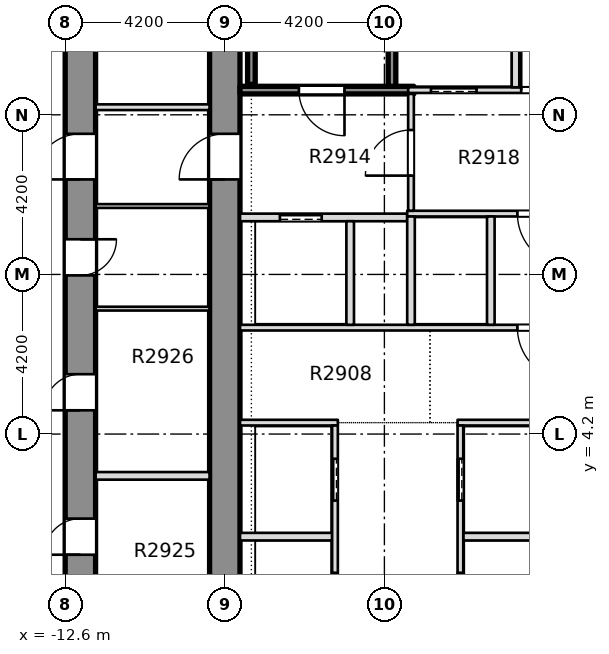
"""IFC4 building model, lengths in metres.
Left out: names, types, materials, properties, quantities, classifications, styles, units other than length and angle.
Written with IfcOpenShell. Run it as: python <this file> out.ifc"""

import sys

from ifc_helpers import new_model, si_unit, direction, frame, frame_2d, origin, place, context, subcontext, project, spatial, rectangle, extrude, element, fill, save


model = new_model("IFC4")
c1 = context("Model", 3, precision=1e-05, world=origin(), true_north=direction((0.0, 1.0)))
c2 = subcontext(c1, "Body", "Model", "MODEL_VIEW")
j1 = project(units=[si_unit("LENGTHUNIT", "METRE"), si_unit("PLANEANGLEUNIT", "RADIAN")], contexts=[c1])
p1 = place(None, origin())
s1 = spatial("IfcSite", under=j1, at=p1, CompositionType="ELEMENT")
p2 = place(p1, origin())
s2 = spatial("IfcBuilding", under=s1, at=p2, CompositionType="ELEMENT")
p3 = place(p2, frame((0.0, 0.0, 114.9)))
s3 = spatial("IfcBuildingStorey", under=s2, at=p3, CompositionType="ELEMENT", Elevation=114.9)
p4 = place(p3, frame((-12.2, -8.4, -0.32), z_axis=(0.0, 0.0, 1.0), x_axis=(0.0, 1.0, 0.0)))
e1 = element("IfcWall", 1, at=p4, inside=s3, PredefinedType="SHEAR", context=c2, shape_type="SweptSolid", body=[
    extrude(rectangle(XDim=30.15, YDim=0.8, at=frame_2d((15.075, 0.0))), origin(), (0.0, 0.0, 1.0), 3.45),
])
p5 = place(p4, frame((2.875, 0.0, 0.32)))
e2 = element("IfcOpeningElement", 2, at=p5, cuts=e1, PredefinedType="OPENING", context=c2, shape_type="SweptSolid", body=[
    extrude(rectangle(XDim=0.95, YDim=2.1, at=frame_2d((0.475, 1.05))), frame((0.0, 0.41, 0.0), z_axis=(0.0, -1.0, 0.0), x_axis=(1.0, 0.0, 0.0)), (0.0, 0.0, 1.0), 0.82),
])
p6 = place(p4, frame((6.575, 0.0, 0.32)))
e3 = element("IfcOpeningElement", 3, at=p6, cuts=e1, PredefinedType="OPENING", context=c2, shape_type="SweptSolid", body=[
    extrude(rectangle(XDim=0.95, YDim=2.1, at=frame_2d((0.475, 1.05))), frame((0.0, 0.41, 0.0), z_axis=(0.0, -1.0, 0.0), x_axis=(1.0, 0.0, 0.0)), (0.0, 0.0, 1.0), 0.82),
])
p7 = place(p4, frame((9.425, 0.0, 0.32)))
e4 = element("IfcOpeningElement", 4, at=p7, cuts=e1, PredefinedType="OPENING", context=c2, shape_type="SweptSolid", body=[
    extrude(rectangle(XDim=0.95, YDim=2.1, at=frame_2d((0.475, 1.05))), frame((0.0, 0.41, 0.0), z_axis=(0.0, -1.0, 0.0), x_axis=(1.0, 0.0, 0.0)), (0.0, 0.0, 1.0), 0.82),
])
p8 = place(p4, frame((13.225, 0.0, 0.32)))
e5 = element("IfcOpeningElement", 5, at=p8, cuts=e1, PredefinedType="OPENING", context=c2, shape_type="SweptSolid", body=[
    extrude(rectangle(XDim=0.95, YDim=2.1, at=frame_2d((0.475, 1.05))), frame((0.0, 0.41, 0.0), z_axis=(0.0, -1.0, 0.0), x_axis=(1.0, 0.0, 0.0)), (0.0, 0.0, 1.0), 0.82),
])
p9 = place(p4, frame((16.775, 0.0, 0.32)))
e6 = element("IfcOpeningElement", 6, at=p9, cuts=e1, PredefinedType="OPENING", context=c2, shape_type="SweptSolid", body=[
    extrude(rectangle(XDim=0.95, YDim=2.1, at=frame_2d((0.475, 1.05))), frame((0.0, 0.41, 0.0), z_axis=(0.0, -1.0, 0.0), x_axis=(1.0, 0.0, 0.0)), (0.0, 0.0, 1.0), 0.82),
])
p10 = place(p4, frame((24.75, 0.0, 0.32)))
e7 = element("IfcOpeningElement", 7, at=p10, cuts=e1, PredefinedType="OPENING", context=c2, shape_type="SweptSolid", body=[
    extrude(rectangle(XDim=0.95, YDim=2.1, at=frame_2d((0.475, 1.05))), frame((0.0, 0.41, 0.0), z_axis=(0.0, -1.0, 0.0), x_axis=(1.0, 0.0, 0.0)), (0.0, 0.0, 1.0), 0.82),
])
p11 = place(p4, frame((19.3, 0.0, 0.32)))
e8 = element("IfcOpeningElement", 8, at=p11, cuts=e1, PredefinedType="OPENING", context=c2, shape_type="SweptSolid", body=[
    extrude(rectangle(XDim=1.2, YDim=2.1, at=frame_2d((0.6, 1.05))), frame((0.0, 0.41, 0.0), z_axis=(0.0, -1.0, 0.0), x_axis=(1.0, 0.0, 0.0)), (0.0, 0.0, 1.0), 0.82),
])
p12 = place(p3, frame((-8.4, -7.6, -0.32), z_axis=(0.0, 0.0, 1.0), x_axis=(0.0, 1.0, 0.0)))
e9 = element("IfcWall", 9, at=p12, inside=s3, PredefinedType="SHEAR", context=c2, shape_type="SweptSolid", body=[
    extrude(rectangle(XDim=28.55, YDim=0.8, at=frame_2d((14.275, 0.0))), origin(), (0.0, 0.0, 1.0), 3.45),
])
p13 = place(p12, frame((18.5, 0.0, 0.32)))
e10 = element("IfcOpeningElement", 10, at=p13, cuts=e9, PredefinedType="OPENING", context=c2, shape_type="SweptSolid", body=[
    extrude(rectangle(XDim=1.2, YDim=2.1, at=frame_2d((0.6, 1.05))), frame((0.0, 0.41, 0.0), z_axis=(0.0, -1.0, 0.0), x_axis=(1.0, 0.0, 0.0)), (0.0, 0.0, 1.0), 0.82),
])
p14 = place(p3, frame((-7.999, 1.5, 0.0), z_axis=(0.0, 0.0, 1.0), x_axis=(1.0, 0.0, 0.0)))
e11 = element("IfcWall", 11, at=p14, inside=s3, PredefinedType="PARTITIONING", context=c2, shape_type="SweptSolid", body=[
    extrude(rectangle(XDim=2.424, YDim=0.2, at=frame_2d((1.212, 0.0))), origin(), (0.0, 0.0, 1.0), 3.13),
])
p15 = place(p3, frame((-2.125, 1.5, 0.0), z_axis=(0.0, 0.0, 1.0), x_axis=(1.0, 0.0, 0.0)))
e12 = element("IfcWall", 12, at=p15, inside=s3, PredefinedType="PARTITIONING", context=c2, shape_type="SweptSolid", body=[
    extrude(rectangle(XDim=4.25, YDim=0.2, at=frame_2d((2.125, 0.0))), origin(), (0.0, 0.0, 1.0), 3.13),
])
p16 = place(p3, frame((-7.999, 4.5, 0.0), z_axis=(0.0, 0.0, 1.0), x_axis=(1.0, 0.0, 0.0)))
e13 = element("IfcWall", 13, at=p16, inside=s3, PredefinedType="PARTITIONING", context=c2, shape_type="SweptSolid", body=[
    extrude(rectangle(XDim=2.574, YDim=0.15, at=frame_2d((1.287, 0.0))), origin(), (0.0, 0.0, 1.0), 3.13),
])
p17 = place(p3, frame((-2.275, 4.5, 0.0), z_axis=(0.0, 0.0, 1.0), x_axis=(1.0, 0.0, 0.0)))
e14 = element("IfcWall", 14, at=p17, inside=s3, PredefinedType="PARTITIONING", context=c2, shape_type="SweptSolid", body=[
    extrude(rectangle(XDim=4.55, YDim=0.15, at=frame_2d((2.275, 0.0))), origin(), (0.0, 0.0, 1.0), 3.13),
])
p18 = place(p3, frame((-7.999, 7.0, 0.0), z_axis=(0.0, 0.0, 1.0), x_axis=(1.0, 0.0, 0.0)))
e15 = element("IfcWall", 15, at=p18, inside=s3, PredefinedType="PARTITIONING", context=c2, shape_type="SweptSolid", body=[
    extrude(rectangle(XDim=15.998, YDim=0.15, at=frame_2d((7.999, 0.0))), origin(), (0.0, 0.0, 1.0), 3.13),
])
p19 = place(p18, frame((7.299, 0.0, 0.0)))
e16 = element("IfcOpeningElement", 16, at=p19, cuts=e15, PredefinedType="OPENING", context=c2, shape_type="SweptSolid", body=[
    extrude(rectangle(XDim=1.4, YDim=2.1, at=frame_2d((0.7, 1.05))), frame((0.0, 0.085, 0.0), z_axis=(0.0, -1.0, 0.0), x_axis=(1.0, 0.0, 0.0)), (0.0, 0.0, 1.0), 0.17),
])
p20 = place(p3, frame((-7.999, 9.9, 0.0), z_axis=(0.0, 0.0, 1.0), x_axis=(1.0, 0.0, 0.0)))
e17 = element("IfcWall", 17, at=p20, inside=s3, PredefinedType="PARTITIONING", context=c2, shape_type="SweptSolid", body=[
    extrude(rectangle(XDim=4.399, YDim=0.2, at=frame_2d((2.199, 0.0))), origin(), (0.0, 0.0, 1.0), 3.13),
])
p21 = place(p20, frame((1.049, 0.0, 0.0)))
e18 = element("IfcOpeningElement", 18, at=p21, cuts=e17, PredefinedType="OPENING", context=c2, shape_type="SweptSolid", body=[
    extrude(rectangle(XDim=1.1, YDim=2.1, at=frame_2d((0.55, 1.05))), frame((0.0, 0.11, 0.0), z_axis=(0.0, -1.0, 0.0), x_axis=(1.0, 0.0, 0.0)), (0.0, 0.0, 1.0), 0.22),
])
p22 = place(p3, frame((-3.6, 10.0, 0.0), z_axis=(0.0, 0.0, 1.0), x_axis=(1.0, 0.0, 0.0)))
e19 = element("IfcWall", 19, at=p22, inside=s3, PredefinedType="PARTITIONING", context=c2, shape_type="SweptSolid", body=[
    extrude(rectangle(XDim=7.2, YDim=0.15, at=frame_2d((3.6, 0.0))), origin(), (0.0, 0.0, 1.0), 3.13),
])
p23 = place(p22, frame((2.9, 0.0, 0.0)))
e20 = element("IfcOpeningElement", 20, at=p23, cuts=e19, PredefinedType="OPENING", context=c2, shape_type="SweptSolid", body=[
    extrude(rectangle(XDim=1.4, YDim=2.1, at=frame_2d((0.7, 1.05))), frame((0.0, 0.085, 0.0), z_axis=(0.0, -1.0, 0.0), x_axis=(1.0, 0.0, 0.0)), (0.0, 0.0, 1.0), 0.17),
])
p24 = place(p3, frame((-7.999, 13.25, 0.0), z_axis=(0.0, 0.0, 1.0), x_axis=(1.0, 0.0, 0.0)))
e21 = element("IfcWall", 21, at=p24, inside=s3, PredefinedType="SOLIDWALL", context=c2, shape_type="SweptSolid", body=[
    extrude(rectangle(XDim=4.574, YDim=0.2, at=frame_2d((2.287, 0.0))), origin(), (0.0, 0.0, 1.0), 3.13),
])
p25 = place(p24, frame((1.549, 0.0, 0.0)))
e22 = element("IfcOpeningElement", 22, at=p25, cuts=e21, PredefinedType="OPENING", context=c2, shape_type="SweptSolid", body=[
    extrude(rectangle(XDim=1.2, YDim=2.1, at=frame_2d((0.6, 1.05))), frame((0.0, 0.11, 0.0), z_axis=(0.0, -1.0, 0.0), x_axis=(1.0, 0.0, 0.0)), (0.0, 0.0, 1.0), 0.22),
])
p26 = place(p3, frame((-3.575, 13.25, 0.0), z_axis=(0.0, 0.0, 1.0), x_axis=(1.0, 0.0, 0.0)))
e23 = element("IfcWall", 23, at=p26, inside=s3, PredefinedType="PARTITIONING", context=c2, shape_type="SweptSolid", body=[
    extrude(rectangle(XDim=7.15, YDim=0.15, at=frame_2d((3.575, 0.0))), origin(), (0.0, 0.0, 1.0), 3.13),
])
p27 = place(p26, frame((0.6, 0.0, 0.0)))
e24 = element("IfcOpeningElement", 24, at=p27, cuts=e23, PredefinedType="OPENING", context=c2, shape_type="SweptSolid", body=[
    extrude(rectangle(XDim=1.2, YDim=2.1, at=frame_2d((0.6, 1.05))), frame((0.0, 0.085, 0.0), z_axis=(0.0, -1.0, 0.0), x_axis=(1.0, 0.0, 0.0)), (0.0, 0.0, 1.0), 0.17),
])
p28 = place(p26, frame((5.4, 0.0, 0.0)))
e25 = element("IfcOpeningElement", 25, at=p28, cuts=e23, PredefinedType="OPENING", context=c2, shape_type="SweptSolid", body=[
    extrude(rectangle(XDim=1.1, YDim=2.1, at=frame_2d((0.55, 1.05))), frame((0.0, 0.085, 0.0), z_axis=(0.0, -1.0, 0.0), x_axis=(1.0, 0.0, 0.0)), (0.0, 0.0, 1.0), 0.17),
])
p29 = place(p26, frame((2.975, 0.0, 0.0)))
e26 = element("IfcOpeningElement", 26, at=p29, cuts=e23, PredefinedType="OPENING", context=c2, shape_type="SweptSolid", body=[
    extrude(rectangle(XDim=1.2, YDim=2.1, at=frame_2d((0.6, 1.05))), frame((0.0, 0.085, 0.0), z_axis=(0.0, -1.0, 0.0), x_axis=(1.0, 0.0, 0.0)), (0.0, 0.0, 1.0), 0.17),
])
p30 = place(p3, frame((-5.5, -7.599, 0.0), z_axis=(0.0, 0.0, 1.0), x_axis=(0.0, 1.0, 0.0)))
e27 = element("IfcWall", 27, at=p30, inside=s3, PredefinedType="PARTITIONING", context=c2, shape_type="SweptSolid", body=[
    extrude(rectangle(XDim=12.024, YDim=0.15, at=frame_2d((6.012, 0.0))), origin(), (0.0, 0.0, 1.0), 3.13),
])
p31 = place(p30, frame((1.049, 0.0, 0.0)))
e28 = element("IfcOpeningElement", 28, at=p31, cuts=e27, PredefinedType="OPENING", context=c2, shape_type="SweptSolid", body=[
    extrude(rectangle(XDim=1.1, YDim=2.1, at=frame_2d((0.55, 1.05))), frame((0.0, 0.085, 0.0), z_axis=(0.0, -1.0, 0.0), x_axis=(1.0, 0.0, 0.0)), (0.0, 0.0, 1.0), 0.17),
])
p32 = place(p30, frame((4.049, 0.0, 0.0)))
e29 = element("IfcOpeningElement", 29, at=p32, cuts=e27, PredefinedType="OPENING", context=c2, shape_type="SweptSolid", body=[
    extrude(rectangle(XDim=1.1, YDim=2.1, at=frame_2d((0.55, 1.05))), frame((0.0, 0.085, 0.0), z_axis=(0.0, -1.0, 0.0), x_axis=(1.0, 0.0, 0.0)), (0.0, 0.0, 1.0), 0.17),
])
p33 = place(p30, frame((7.049, 0.0, 0.0)))
e30 = element("IfcOpeningElement", 30, at=p33, cuts=e27, PredefinedType="OPENING", context=c2, shape_type="SweptSolid", body=[
    extrude(rectangle(XDim=1.1, YDim=2.1, at=frame_2d((0.55, 1.05))), frame((0.0, 0.085, 0.0), z_axis=(0.0, -1.0, 0.0), x_axis=(1.0, 0.0, 0.0)), (0.0, 0.0, 1.0), 0.17),
])
p34 = place(p30, frame((10.049, 0.0, 0.0)))
e31 = element("IfcOpeningElement", 31, at=p34, cuts=e27, PredefinedType="OPENING", context=c2, shape_type="SweptSolid", body=[
    extrude(rectangle(XDim=1.1, YDim=2.1, at=frame_2d((0.55, 1.05))), frame((0.0, 0.085, 0.0), z_axis=(0.0, -1.0, 0.0), x_axis=(1.0, 0.0, 0.0)), (0.0, 0.0, 1.0), 0.17),
])
p35 = place(p3, frame((-5.1, 7.075, 0.0), z_axis=(0.0, 0.0, 1.0), x_axis=(0.0, 1.0, 0.0)))
e32 = element("IfcWall", 32, at=p35, inside=s3, PredefinedType="PARTITIONING", context=c2, shape_type="SweptSolid", body=[
    extrude(rectangle(XDim=2.725, YDim=0.2, at=frame_2d((1.363, 0.0))), origin(), (0.0, 0.0, 1.0), 3.13),
])
p36 = place(p3, frame((-4.0, 13.35, 0.0), z_axis=(0.0, 0.0, 1.0), x_axis=(0.0, 1.0, 0.0)))
e33 = element("IfcWall", 33, at=p36, inside=s3, PredefinedType="SOLIDWALL", context=c2, shape_type="SweptSolid", body=[
    extrude(rectangle(XDim=7.599, YDim=0.2, at=frame_2d((3.799, 0.0))), origin(), (0.0, 0.0, 1.0), 3.13),
])
p37 = place(p3, frame((-3.5, 7.075, 0.0), z_axis=(0.0, 0.0, 1.0), x_axis=(0.0, 1.0, 0.0)))
e34 = element("IfcWall", 34, at=p37, inside=s3, PredefinedType="PARTITIONING", context=c2, shape_type="SweptSolid", body=[
    extrude(rectangle(XDim=2.85, YDim=0.2, at=frame_2d((1.425, 0.0))), origin(), (0.0, 0.0, 1.0), 3.13),
])
p38 = place(p3, frame((-3.5, 10.075, 0.0), z_axis=(0.0, 0.0, 1.0), x_axis=(0.0, 1.0, 0.0)))
e35 = element("IfcWall", 35, at=p38, inside=s3, PredefinedType="PARTITIONING", context=c2, shape_type="SweptSolid", body=[
    extrude(rectangle(XDim=3.075, YDim=0.15, at=frame_2d((1.538, 0.0))), origin(), (0.0, 0.0, 1.0), 3.13),
])
p39 = place(p38, frame((0.925, 0.0, 0.0)))
e36 = element("IfcOpeningElement", 36, at=p39, cuts=e35, PredefinedType="OPENING", context=c2, shape_type="SweptSolid", body=[
    extrude(rectangle(XDim=1.2, YDim=2.1, at=frame_2d((0.6, 1.05))), frame((0.0, 0.085, 0.0), z_axis=(0.0, -1.0, 0.0), x_axis=(1.0, 0.0, 0.0)), (0.0, 0.0, 1.0), 0.17),
])
p40 = place(p3, frame((-2.2, -7.599, 0.0), z_axis=(0.0, 0.0, 1.0), x_axis=(0.0, 1.0, 0.0)))
e37 = element("IfcWall", 37, at=p40, inside=s3, PredefinedType="PARTITIONING", context=c2, shape_type="SweptSolid", body=[
    extrude(rectangle(XDim=12.024, YDim=0.15, at=frame_2d((6.012, 0.0))), origin(), (0.0, 0.0, 1.0), 3.13),
])
p41 = place(p40, frame((1.049, 0.0, 0.0)))
e38 = element("IfcOpeningElement", 38, at=p41, cuts=e37, PredefinedType="OPENING", context=c2, shape_type="SweptSolid", body=[
    extrude(rectangle(XDim=1.1, YDim=2.1, at=frame_2d((0.55, 1.05))), frame((0.0, 0.085, 0.0), z_axis=(0.0, -1.0, 0.0), x_axis=(1.0, 0.0, 0.0)), (0.0, 0.0, 1.0), 0.17),
])
p42 = place(p40, frame((4.049, 0.0, 0.0)))
e39 = element("IfcOpeningElement", 39, at=p42, cuts=e37, PredefinedType="OPENING", context=c2, shape_type="SweptSolid", body=[
    extrude(rectangle(XDim=1.1, YDim=2.1, at=frame_2d((0.55, 1.05))), frame((0.0, 0.085, 0.0), z_axis=(0.0, -1.0, 0.0), x_axis=(1.0, 0.0, 0.0)), (0.0, 0.0, 1.0), 0.17),
])
p43 = place(p40, frame((7.049, 0.0, 0.0)))
e40 = element("IfcOpeningElement", 40, at=p43, cuts=e37, PredefinedType="OPENING", context=c2, shape_type="SweptSolid", body=[
    extrude(rectangle(XDim=1.1, YDim=2.1, at=frame_2d((0.55, 1.05))), frame((0.0, 0.085, 0.0), z_axis=(0.0, -1.0, 0.0), x_axis=(1.0, 0.0, 0.0)), (0.0, 0.0, 1.0), 0.17),
])
p44 = place(p40, frame((10.049, 0.0, 0.0)))
e41 = element("IfcOpeningElement", 41, at=p44, cuts=e37, PredefinedType="OPENING", context=c2, shape_type="SweptSolid", body=[
    extrude(rectangle(XDim=1.1, YDim=2.1, at=frame_2d((0.55, 1.05))), frame((0.0, 0.085, 0.0), z_axis=(0.0, -1.0, 0.0), x_axis=(1.0, 0.0, 0.0)), (0.0, 0.0, 1.0), 0.17),
])
p45 = place(p3, frame((-1.4, 7.075, 0.0), z_axis=(0.0, 0.0, 1.0), x_axis=(0.0, 1.0, 0.0)))
e42 = element("IfcWall", 42, at=p45, inside=s3, PredefinedType="PARTITIONING", context=c2, shape_type="SweptSolid", body=[
    extrude(rectangle(XDim=2.85, YDim=0.2, at=frame_2d((1.425, 0.0))), origin(), (0.0, 0.0, 1.0), 3.13),
])
p46 = place(p3, frame((-0.75, 13.325, 0.0), z_axis=(0.0, 0.0, 1.0), x_axis=(0.0, 1.0, 0.0)))
e43 = element("IfcWall", 43, at=p46, inside=s3, PredefinedType="PARTITIONING", context=c2, shape_type="SweptSolid", body=[
    extrude(rectangle(XDim=7.624, YDim=0.2, at=frame_2d((3.812, 0.0))), origin(), (0.0, 0.0, 1.0), 3.13),
])
p47 = place(p46, frame((4.8, 0.0, 0.0)))
e44 = element("IfcOpeningElement", 44, at=p47, cuts=e43, PredefinedType="OPENING", context=c2, shape_type="SweptSolid", body=[
    extrude(rectangle(XDim=0.95, YDim=2.1, at=frame_2d((0.475, 1.05))), frame((0.0, 0.11, 0.0), z_axis=(0.0, -1.0, 0.0), x_axis=(1.0, 0.0, 0.0)), (0.0, 0.0, 1.0), 0.22),
])
p48 = place(p3, frame((-11.799, 3.1, 0.0), z_axis=(0.0, 0.0, 1.0), x_axis=(1.0, 0.0, 0.0)))
e45 = element("IfcWall", 45, at=p48, inside=s3, PredefinedType="PARTITIONING", context=c2, shape_type="SweptSolid", body=[
    extrude(rectangle(XDim=2.998, YDim=0.2, at=frame_2d((1.499, 0.0))), origin(), (0.0, 0.0, 1.0), 3.13),
])
for number, where, z_axis, x_axis in (
    (46, (-11.799, 7.5, 0.0), (0.0, 0.0, 1.0), (1.0, 0.0, 0.0)),
    (47, (-11.799, 10.2, 0.0), (0.0, 0.0, 1.0), (1.0, 0.0, 0.0)),
):
    element("IfcWall", number, at=place(p3, frame(where, z_axis=z_axis, x_axis=x_axis)), inside=s3, PredefinedType="PARTITIONING", context=c2, shape_type="SweptSolid", body=[
        extrude(rectangle(XDim=2.998, YDim=0.1, at=frame_2d((1.499, 0.0))), origin(), (0.0, 0.0, 1.0), 3.13),
    ])
p49 = place(p3, frame((-11.799, 12.8, 0.0), z_axis=(0.0, 0.0, 1.0), x_axis=(1.0, 0.0, 0.0)))
e48 = element("IfcWall", 48, at=p49, inside=s3, PredefinedType="PARTITIONING", context=c2, shape_type="SweptSolid", body=[
    extrude(rectangle(XDim=2.998, YDim=0.15, at=frame_2d((1.499, 0.0))), origin(), (0.0, 0.0, 1.0), 3.13),
])
p50 = place(p3, frame((-7.7, 13.4, 0.0), z_axis=(0.0, 0.0, 1.0), x_axis=(0.0, 1.0, 0.0)))
e49 = element("IfcWall", 49, at=p50, inside=s3, PredefinedType="SOLIDWALL", context=c2, shape_type="SweptSolid", body=[
    extrude(rectangle(XDim=7.45, YDim=0.2, at=frame_2d((3.725, 0.0))), origin(), (0.0, 0.0, 1.0), 3.13),
])
p51 = place(p33, origin())
e50 = element("IfcDoor", 50, at=p51, inside=s3, OperationType="SLIDING_TO_LEFT", PredefinedType="DOOR", context=c2, shape_type="SweptSolid", body=[
    extrude(rectangle(XDim=1.1, YDim=2.1, at=frame_2d((0.55, 1.05))), frame((0.0, 0.025, 0.0), z_axis=(0.0, -1.0, 0.0), x_axis=(1.0, 0.0, 0.0)), (0.0, 0.0, 1.0), 0.05),
])
fill(e30, e50)
p52 = place(p34, origin())
e51 = element("IfcDoor", 51, at=p52, inside=s3, OperationType="SLIDING_TO_LEFT", PredefinedType="DOOR", context=c2, shape_type="SweptSolid", body=[
    extrude(rectangle(XDim=1.1, YDim=2.1, at=frame_2d((0.55, 1.05))), frame((0.0, 0.025, 0.0), z_axis=(0.0, -1.0, 0.0), x_axis=(1.0, 0.0, 0.0)), (0.0, 0.0, 1.0), 0.05),
])
fill(e31, e51)
p53 = place(p43, origin())
e52 = element("IfcDoor", 52, at=p53, inside=s3, OperationType="SLIDING_TO_LEFT", PredefinedType="DOOR", context=c2, shape_type="SweptSolid", body=[
    extrude(rectangle(XDim=1.1, YDim=2.1, at=frame_2d((0.55, 1.05))), frame((0.0, 0.025, 0.0), z_axis=(0.0, -1.0, 0.0), x_axis=(1.0, 0.0, 0.0)), (0.0, 0.0, 1.0), 0.05),
])
fill(e40, e52)
p54 = place(p44, origin())
e53 = element("IfcDoor", 53, at=p54, inside=s3, OperationType="SLIDING_TO_LEFT", PredefinedType="DOOR", context=c2, shape_type="SweptSolid", body=[
    extrude(rectangle(XDim=1.1, YDim=2.1, at=frame_2d((0.55, 1.05))), frame((0.0, 0.025, 0.0), z_axis=(0.0, -1.0, 0.0), x_axis=(1.0, 0.0, 0.0)), (0.0, 0.0, 1.0), 0.05),
])
fill(e41, e53)
p55 = place(p25, origin())
e54 = element("IfcDoor", 54, at=p55, inside=s3, OperationType="SINGLE_SWING_LEFT", PredefinedType="DOOR", context=c2, shape_type="SweptSolid", body=[
    extrude(rectangle(XDim=1.2, YDim=2.1, at=frame_2d((0.6, 1.05))), frame((0.0, 0.025, 0.0), z_axis=(0.0, -1.0, 0.0), x_axis=(1.0, 0.0, 0.0)), (0.0, 0.0, 1.0), 0.05),
])
fill(e22, e54)
p56 = place(p21, origin())
e55 = element("IfcDoor", 55, at=p56, inside=s3, OperationType="SLIDING_TO_LEFT", PredefinedType="DOOR", context=c2, shape_type="SweptSolid", body=[
    extrude(rectangle(XDim=1.1, YDim=2.1, at=frame_2d((0.55, 1.05))), frame((0.0, 0.025, 0.0), z_axis=(0.0, -1.0, 0.0), x_axis=(1.0, 0.0, 0.0)), (0.0, 0.0, 1.0), 0.05),
])
fill(e18, e55)
p57 = place(p19, origin())
e56 = element("IfcDoor", 56, at=p57, inside=s3, OperationType="SINGLE_SWING_RIGHT", PredefinedType="DOOR", context=c2, shape_type="SweptSolid", body=[
    extrude(rectangle(XDim=1.4, YDim=2.1, at=frame_2d((0.7, 1.05))), frame((0.0, 0.025, 0.0), z_axis=(0.0, -1.0, 0.0), x_axis=(1.0, 0.0, 0.0)), (0.0, 0.0, 1.0), 0.05),
])
fill(e16, e56)
p58 = place(p23, origin())
e57 = element("IfcDoor", 57, at=p58, inside=s3, OperationType="SINGLE_SWING_RIGHT", PredefinedType="DOOR", context=c2, shape_type="SweptSolid", body=[
    extrude(rectangle(XDim=1.4, YDim=2.1, at=frame_2d((0.7, 1.05))), frame((0.0, 0.025, 0.0), z_axis=(0.0, -1.0, 0.0), x_axis=(1.0, 0.0, 0.0)), (0.0, 0.0, 1.0), 0.05),
])
fill(e20, e57)
p59 = place(p27, origin())
e58 = element("IfcDoor", 58, at=p59, inside=s3, OperationType="SLIDING_TO_RIGHT", PredefinedType="DOOR", context=c2, shape_type="SweptSolid", body=[
    extrude(rectangle(XDim=1.2, YDim=2.1, at=frame_2d((0.6, 1.05))), frame((0.0, 0.025, 0.0), z_axis=(0.0, -1.0, 0.0), x_axis=(1.0, 0.0, 0.0)), (0.0, 0.0, 1.0), 0.05),
])
fill(e24, e58)
p60 = place(p29, origin())
e59 = element("IfcDoor", 59, at=p60, inside=s3, OperationType="SINGLE_SWING_RIGHT", PredefinedType="DOOR", context=c2, shape_type="SweptSolid", body=[
    extrude(rectangle(XDim=1.2, YDim=2.1, at=frame_2d((0.6, 1.05))), frame((0.0, 0.025, 0.0), z_axis=(0.0, -1.0, 0.0), x_axis=(1.0, 0.0, 0.0)), (0.0, 0.0, 1.0), 0.05),
])
fill(e26, e59)
p61 = place(p39, origin())
e60 = element("IfcDoor", 60, at=p61, inside=s3, OperationType="SINGLE_SWING_RIGHT", PredefinedType="DOOR", context=c2, shape_type="SweptSolid", body=[
    extrude(rectangle(XDim=1.2, YDim=2.1, at=frame_2d((0.6, 1.05))), frame((0.0, 0.025, 0.0), z_axis=(0.0, -1.0, 0.0), x_axis=(1.0, 0.0, 0.0)), (0.0, 0.0, 1.0), 0.05),
])
fill(e36, e60)
p62 = place(p7, origin())
e61 = element("IfcDoor", 61, at=p62, inside=s3, OperationType="SINGLE_SWING_LEFT", PredefinedType="DOOR", context=c2, shape_type="SweptSolid", body=[
    extrude(rectangle(XDim=0.95, YDim=2.1, at=frame_2d((0.475, 1.05))), frame((0.0, 0.025, 0.0), z_axis=(0.0, -1.0, 0.0), x_axis=(1.0, 0.0, 0.0)), (0.0, 0.0, 1.0), 0.05),
])
fill(e4, e61)
p63 = place(p8, origin())
e62 = element("IfcDoor", 62, at=p63, inside=s3, OperationType="SINGLE_SWING_LEFT", PredefinedType="DOOR", context=c2, shape_type="SweptSolid", body=[
    extrude(rectangle(XDim=0.95, YDim=2.1, at=frame_2d((0.475, 1.05))), frame((0.0, 0.025, 0.0), z_axis=(0.0, -1.0, 0.0), x_axis=(1.0, 0.0, 0.0)), (0.0, 0.0, 1.0), 0.05),
])
fill(e5, e62)
p64 = place(p9, origin())
e63 = element("IfcDoor", 63, at=p64, inside=s3, OperationType="SINGLE_SWING_LEFT", PredefinedType="DOOR", context=c2, shape_type="SweptSolid", body=[
    extrude(rectangle(XDim=0.95, YDim=2.1, at=frame_2d((0.475, 1.05))), frame((0.0, 0.025, 0.0), z_axis=(0.0, -1.0, 0.0), x_axis=(1.0, 0.0, 0.0)), (0.0, 0.0, 1.0), 0.05),
])
fill(e6, e63)
p65 = place(p11, origin())
e64 = element("IfcDoor", 64, at=p65, inside=s3, OperationType="SINGLE_SWING_LEFT", PredefinedType="DOOR", context=c2, shape_type="SweptSolid", body=[
    extrude(rectangle(XDim=1.2, YDim=2.1, at=frame_2d((0.6, 1.05))), frame((0.0, 0.025, 0.0), z_axis=(0.0, -1.0, 0.0), x_axis=(1.0, 0.0, 0.0)), (0.0, 0.0, 1.0), 0.05),
])
fill(e8, e64)
p66 = place(p13, origin())
e65 = element("IfcDoor", 65, at=p66, inside=s3, OperationType="SINGLE_SWING_LEFT", PredefinedType="DOOR", context=c2, shape_type="SweptSolid", body=[
    extrude(rectangle(XDim=1.2, YDim=2.1, at=frame_2d((0.6, 1.05))), frame((0.0, 0.025, 0.0), z_axis=(0.0, -1.0, 0.0), x_axis=(1.0, 0.0, 0.0)), (0.0, 0.0, 1.0), 0.05),
])
fill(e10, e65)
save(model, sys.argv[1])
